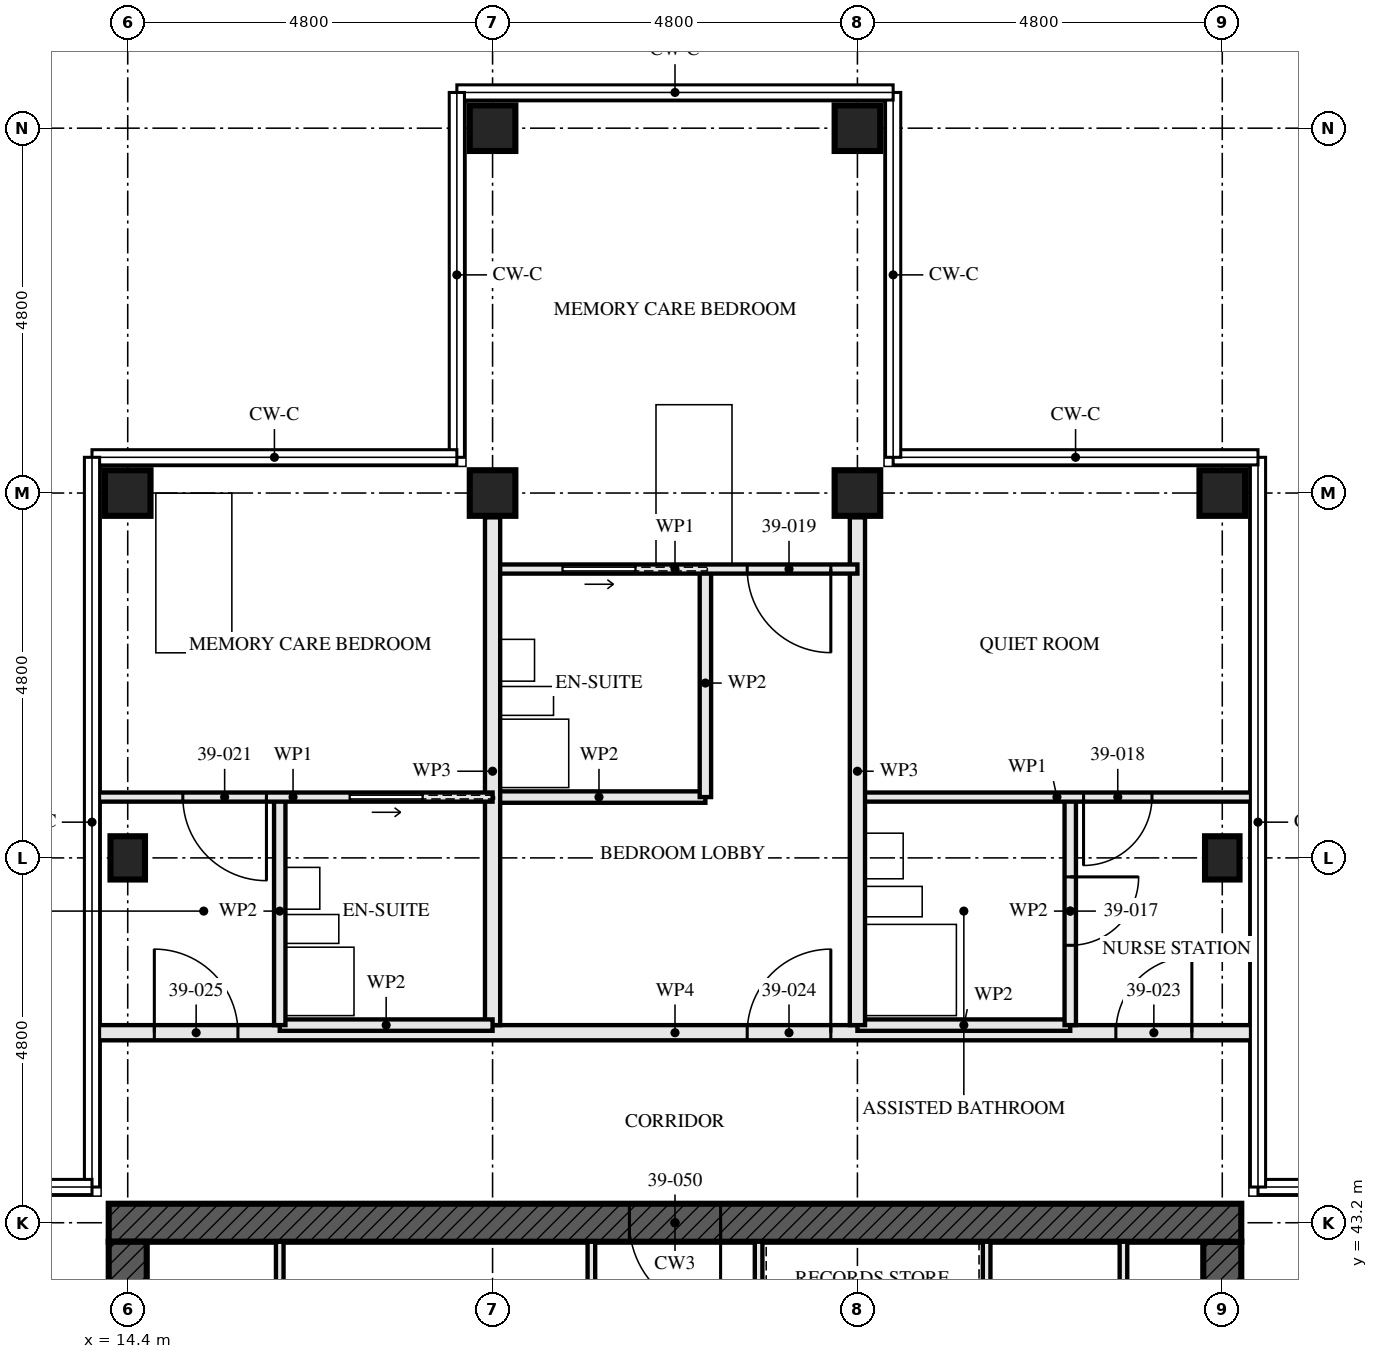
"""IFC4 building model, lengths in metres.
Left out: names, types, materials, properties, quantities, classifications, styles, units other than length and angle.
Written with IfcOpenShell. Run it as: python <this file> out.ifc"""

import sys

from ifc_helpers import new_model, si_unit, direction, frame, frame_2d, origin, origin_2d, place, context, subcontext, project, spatial, rectangle, hollow_rectangle, i_section, extrude, element, fill, save


model = new_model("IFC4")
c1 = context("Model", 3, precision=1e-05, world=origin(), true_north=direction((0.0, 1.0)))
c2 = subcontext(c1, "Body", "Model", "MODEL_VIEW")
j1 = project(units=[si_unit("LENGTHUNIT", "METRE"), si_unit("PLANEANGLEUNIT", "RADIAN")], contexts=[c1])
p1 = place(None, origin())
s1 = spatial("IfcSite", under=j1, at=p1, CompositionType="ELEMENT")
p2 = place(p1, origin())
s2 = spatial("IfcBuilding", under=s1, at=p2, CompositionType="ELEMENT")
p3 = place(p2, frame((0.0, 0.0, 144.5)))
s3 = spatial("IfcBuildingStorey", under=s2, at=p3, CompositionType="ELEMENT", Elevation=144.5)
p4 = place(p3, frame((14.4, 48.0, 0.0), z_axis=(0.0, 0.0, 1.0), x_axis=(1.0, 0.0, 0.0)))
e1 = element("IfcColumn", 1, at=p4, inside=s3, PredefinedType="COLUMN", context=c2, shape_type="SweptSolid", body=[
    extrude(i_section(OverallWidth=0.454, OverallDepth=0.569, WebThickness=0.078, FlangeThickness=0.125, FilletRadius=0.015, at=origin_2d()), origin(), (0.0, 0.0, 1.0), 3.5),
])
for number, where, z_axis, x_axis in (
    (2, (14.4, 52.8, 0.0), (0.0, 0.0, 1.0), (0.0, 1.0, 0.0)),
    (3, (19.2, 52.8, 0.0), (0.0, 0.0, 1.0), (0.0, 1.0, 0.0)),
    (4, (19.2, 57.6, 0.0), (0.0, 0.0, 1.0), (0.0, 1.0, 0.0)),
    (5, (24.0, 52.8, 0.0), (0.0, 0.0, 1.0), (0.0, 1.0, 0.0)),
    (6, (24.0, 57.6, 0.0), (0.0, 0.0, 1.0), (0.0, 1.0, 0.0)),
):
    element("IfcColumn", number, at=place(p3, frame(where, z_axis=z_axis, x_axis=x_axis)), inside=s3, PredefinedType="COLUMN", context=c2, shape_type="SweptSolid", body=[
        extrude(hollow_rectangle(XDim=0.6, YDim=0.6, WallThickness=0.05, at=origin_2d()), origin(), (0.0, 0.0, 1.0), 3.5),
    ])
p5 = place(p3, frame((28.8, 48.0, 0.0), z_axis=(0.0, 0.0, 1.0), x_axis=(1.0, 0.0, 0.0)))
e7 = element("IfcColumn", 7, at=p5, inside=s3, PredefinedType="COLUMN", context=c2, shape_type="SweptSolid", body=[
    extrude(i_section(OverallWidth=0.454, OverallDepth=0.569, WebThickness=0.078, FlangeThickness=0.125, FilletRadius=0.015, at=origin_2d()), origin(), (0.0, 0.0, 1.0), 3.5),
])
p6 = place(p3, frame((28.8, 52.8, 0.0), z_axis=(0.0, 0.0, 1.0), x_axis=(0.0, 1.0, 0.0)))
e8 = element("IfcColumn", 8, at=p6, inside=s3, PredefinedType="COLUMN", context=c2, shape_type="SweptSolid", body=[
    extrude(hollow_rectangle(XDim=0.6, YDim=0.6, WallThickness=0.05, at=origin_2d()), origin(), (0.0, 0.0, 1.0), 3.5),
])
p7 = place(p3, frame((29.05, 43.2, -0.17), z_axis=(0.0, 0.0, 1.0), x_axis=(-1.0, 0.0, 0.0)))
e9 = element("IfcWall", 9, at=p7, inside=s3, PredefinedType="SHEAR", context=c2, shape_type="SweptSolid", body=[
    extrude(rectangle(XDim=14.9, YDim=0.5, at=frame_2d((7.45, 0.0))), origin(), (0.0, 0.0, 1.0), 3.5),
])
p8 = place(p7, frame((6.85, 0.0, 0.17)))
e10 = element("IfcOpeningElement", 10, at=p8, cuts=e9, PredefinedType="OPENING", context=c2, shape_type="SweptSolid", body=[
    extrude(rectangle(XDim=1.2, YDim=2.1, at=frame_2d((0.6, 1.05))), frame((0.0, 0.26, 0.0), z_axis=(0.0, -1.0, 0.0), x_axis=(1.0, 0.0, 0.0)), (0.0, 0.0, 1.0), 0.521),
])
p9 = place(p3, frame((14.4, 42.95, -0.17), z_axis=(0.0, 0.0, 1.0), x_axis=(0.0, -1.0, 0.0)))
e11 = element("IfcWall", 11, at=p9, inside=s3, PredefinedType="SHEAR", context=c2, shape_type="SweptSolid", body=[
    extrude(rectangle(XDim=13.9, YDim=0.5, at=frame_2d((6.95, 0.0))), origin(), (0.0, 0.0, 1.0), 3.5),
])
p10 = place(p9, frame((6.35, 0.0, 0.17)))
e12 = element("IfcOpeningElement", 12, at=p10, cuts=e11, PredefinedType="OPENING", context=c2, shape_type="SweptSolid", body=[
    extrude(rectangle(XDim=1.2, YDim=2.1, at=frame_2d((0.6, 1.05))), frame((0.0, 0.26, 0.0), z_axis=(0.0, -1.0, 0.0), x_axis=(1.0, 0.0, 0.0)), (0.0, 0.0, 1.0), 0.521),
])
p11 = place(p3, frame((28.8, 29.05, -0.17), z_axis=(0.0, 0.0, 1.0), x_axis=(0.0, 1.0, 0.0)))
e13 = element("IfcWall", 13, at=p11, inside=s3, PredefinedType="SHEAR", context=c2, shape_type="SweptSolid", body=[
    extrude(rectangle(XDim=13.9, YDim=0.5, at=frame_2d((6.95, 0.0))), origin(), (0.0, 0.0, 1.0), 3.5),
])
p12 = place(p11, frame((6.35, 0.0, 0.17)))
e14 = element("IfcOpeningElement", 14, at=p12, cuts=e13, PredefinedType="OPENING", context=c2, shape_type="SweptSolid", body=[
    extrude(rectangle(XDim=1.2, YDim=2.1, at=frame_2d((0.6, 1.05))), frame((0.0, 0.26, 0.0), z_axis=(0.0, -1.0, 0.0), x_axis=(1.0, 0.0, 0.0)), (0.0, 0.0, 1.0), 0.521),
])
p13 = place(p3, frame((26.8, 48.8, 0.0), z_axis=(0.0, 0.0, 1.0), x_axis=(0.0, -1.0, 0.0)))
e15 = element("IfcWall", 15, at=p13, inside=s3, PredefinedType="PARTITIONING", context=c2, shape_type="SweptSolid", body=[
    extrude(rectangle(XDim=3.0, YDim=0.15, at=frame_2d((1.5, 0.0))), origin(), (0.0, 0.0, 1.0), 2.55),
])
p14 = place(p13, frame((1.05, 0.0, 0.0)))
e16 = element("IfcOpeningElement", 16, at=p14, cuts=e15, PredefinedType="OPENING", context=c2, shape_type="SweptSolid", body=[
    extrude(rectangle(XDim=0.9, YDim=2.1, at=frame_2d((0.45, 1.05))), frame((0.0, 0.085, 0.0), z_axis=(0.0, -1.0, 0.0), x_axis=(1.0, 0.0, 0.0)), (0.0, 0.0, 1.0), 0.171),
])
p15 = place(p3, frame((26.8, 45.8, 0.0), z_axis=(0.0, 0.0, 1.0), x_axis=(-1.0, 0.0, 0.0)))
e17 = element("IfcWall", 17, at=p15, inside=s3, PredefinedType="PARTITIONING", context=c2, shape_type="SweptSolid", body=[
    extrude(rectangle(XDim=2.8, YDim=0.15, at=frame_2d((1.4, 0.0))), origin(), (0.0, 0.0, 1.0), 3.33),
])
p16 = place(p3, frame((29.25, 48.8, 0.0), z_axis=(0.0, 0.0, 1.0), x_axis=(-1.0, 0.0, 0.0)))
e18 = element("IfcWall", 18, at=p16, inside=s3, PredefinedType="PARTITIONING", context=c2, shape_type="SweptSolid", body=[
    extrude(rectangle(XDim=5.25, YDim=0.12, at=frame_2d((2.625, 0.0))), origin(), (0.0, 0.0, 1.0), 2.32),
])
p17 = place(p16, frame((1.375, 0.0, 0.0)))
e19 = element("IfcOpeningElement", 19, at=p17, cuts=e18, PredefinedType="OPENING", context=c2, shape_type="SweptSolid", body=[
    extrude(rectangle(XDim=0.9, YDim=2.1, at=frame_2d((0.45, 1.05))), frame((0.0, 0.071, 0.0), z_axis=(0.0, -1.0, 0.0), x_axis=(1.0, 0.0, 0.0)), (0.0, 0.0, 1.0), 0.141),
])
p18 = place(p3, frame((24.0, 52.48, 0.0), z_axis=(0.0, 0.0, 1.0), x_axis=(0.0, -1.0, 0.0)))
e20 = element("IfcWall", 20, at=p18, inside=s3, PredefinedType="PARTITIONING", context=c2, shape_type="SweptSolid", body=[
    extrude(rectangle(XDim=6.68, YDim=0.2, at=frame_2d((3.34, 0.0))), origin(), (0.0, 0.0, 1.0), 2.55),
])
p19 = place(p3, frame((22.0, 51.8, 0.0), z_axis=(0.0, 0.0, 1.0), x_axis=(0.0, -1.0, 0.0)))
e21 = element("IfcWall", 21, at=p19, inside=s3, PredefinedType="PARTITIONING", context=c2, shape_type="SweptSolid", body=[
    extrude(rectangle(XDim=3.0, YDim=0.15, at=frame_2d((1.5, 0.0))), origin(), (0.0, 0.0, 1.0), 3.33),
])
p20 = place(p3, frame((22.0, 48.8, 0.0), z_axis=(0.0, 0.0, 1.0), x_axis=(-1.0, 0.0, 0.0)))
e22 = element("IfcWall", 22, at=p20, inside=s3, PredefinedType="PARTITIONING", context=c2, shape_type="SweptSolid", body=[
    extrude(rectangle(XDim=2.8, YDim=0.15, at=frame_2d((1.4, 0.0))), origin(), (0.0, 0.0, 1.0), 3.33),
])
p21 = place(p3, frame((24.0, 51.8, 0.0), z_axis=(0.0, 0.0, 1.0), x_axis=(-1.0, 0.0, 0.0)))
e23 = element("IfcWall", 23, at=p21, inside=s3, PredefinedType="PARTITIONING", context=c2, shape_type="SweptSolid", body=[
    extrude(rectangle(XDim=4.8, YDim=0.12, at=frame_2d((2.4, 0.0))), origin(), (0.0, 0.0, 1.0), 3.33),
])
p22 = place(p21, frame((0.35, 0.0, 0.0)))
e24 = element("IfcOpeningElement", 24, at=p22, cuts=e23, PredefinedType="OPENING", context=c2, shape_type="SweptSolid", body=[
    extrude(rectangle(XDim=1.1, YDim=2.1, at=frame_2d((0.55, 1.05))), frame((0.0, 0.071, 0.0), z_axis=(0.0, -1.0, 0.0), x_axis=(1.0, 0.0, 0.0)), (0.0, 0.0, 1.0), 0.141),
])
p23 = place(p21, frame((2.925, 0.0, 0.0)))
e25 = element("IfcOpeningElement", 25, at=p23, cuts=e23, PredefinedType="OPENING", context=c2, shape_type="SweptSolid", body=[
    extrude(rectangle(XDim=0.95, YDim=2.1, at=frame_2d((0.475, 1.05))), frame((0.0, 0.071, 0.0), z_axis=(0.0, -1.0, 0.0), x_axis=(1.0, 0.0, 0.0)), (0.0, 0.0, 1.0), 0.141),
])
p24 = place(p3, frame((19.2, 52.48, 0.0), z_axis=(0.0, 0.0, 1.0), x_axis=(0.0, -1.0, 0.0)))
e26 = element("IfcWall", 26, at=p24, inside=s3, PredefinedType="PARTITIONING", context=c2, shape_type="SweptSolid", body=[
    extrude(rectangle(XDim=6.68, YDim=0.2, at=frame_2d((3.34, 0.0))), origin(), (0.0, 0.0, 1.0), 2.55),
])
p25 = place(p3, frame((16.4, 48.8, 0.0), z_axis=(0.0, 0.0, 1.0), x_axis=(0.0, -1.0, 0.0)))
e27 = element("IfcWall", 27, at=p25, inside=s3, PredefinedType="PARTITIONING", context=c2, shape_type="SweptSolid", body=[
    extrude(rectangle(XDim=3.0, YDim=0.15, at=frame_2d((1.5, 0.0))), origin(), (0.0, 0.0, 1.0), 2.55),
])
p26 = place(p3, frame((19.2, 45.8, 0.0), z_axis=(0.0, 0.0, 1.0), x_axis=(-1.0, 0.0, 0.0)))
e28 = element("IfcWall", 28, at=p26, inside=s3, PredefinedType="PARTITIONING", context=c2, shape_type="SweptSolid", body=[
    extrude(rectangle(XDim=2.8, YDim=0.15, at=frame_2d((1.4, 0.0))), origin(), (0.0, 0.0, 1.0), 3.33),
])
p27 = place(p3, frame((19.2, 48.8, 0.0), z_axis=(0.0, 0.0, 1.0), x_axis=(-1.0, 0.0, 0.0)))
e29 = element("IfcWall", 29, at=p27, inside=s3, PredefinedType="PARTITIONING", context=c2, shape_type="SweptSolid", body=[
    extrude(rectangle(XDim=5.25, YDim=0.12, at=frame_2d((2.625, 0.0))), origin(), (0.0, 0.0, 1.0), 2.32),
])
p28 = place(p27, frame((2.975, 0.0, 0.0)))
e30 = element("IfcOpeningElement", 30, at=p28, cuts=e29, PredefinedType="OPENING", context=c2, shape_type="SweptSolid", body=[
    extrude(rectangle(XDim=1.1, YDim=2.1, at=frame_2d((0.55, 1.05))), frame((0.0, 0.071, 0.0), z_axis=(0.0, -1.0, 0.0), x_axis=(1.0, 0.0, 0.0)), (0.0, 0.0, 1.0), 0.141),
])
p29 = place(p27, frame((0.925, 0.0, 0.0)))
e31 = element("IfcOpeningElement", 31, at=p29, cuts=e29, PredefinedType="OPENING", context=c2, shape_type="SweptSolid", body=[
    extrude(rectangle(XDim=0.95, YDim=2.1, at=frame_2d((0.475, 1.05))), frame((0.0, 0.071, 0.0), z_axis=(0.0, -1.0, 0.0), x_axis=(1.0, 0.0, 0.0)), (0.0, 0.0, 1.0), 0.141),
])
p30 = place(p3, frame((29.25, 45.7, 0.0), z_axis=(0.0, 0.0, 1.0), x_axis=(-1.0, 0.0, 0.0)))
e32 = element("IfcWall", 32, at=p30, inside=s3, PredefinedType="PARTITIONING", context=c2, shape_type="SweptSolid", body=[
    extrude(rectangle(XDim=15.3, YDim=0.2, at=frame_2d((7.65, 0.0))), origin(), (0.0, 0.0, 1.0), 2.32),
])
p31 = place(p30, frame((0.85, 0.0, 0.0)))
e33 = element("IfcOpeningElement", 33, at=p31, cuts=e32, PredefinedType="OPENING", context=c2, shape_type="SweptSolid", body=[
    extrude(rectangle(XDim=1.0, YDim=2.1, at=frame_2d((0.5, 1.05))), frame((0.0, 0.111, 0.0), z_axis=(0.0, -1.0, 0.0), x_axis=(1.0, 0.0, 0.0)), (0.0, 0.0, 1.0), 0.221),
])
p32 = place(p30, frame((5.6, 0.0, 0.0)))
e34 = element("IfcOpeningElement", 34, at=p32, cuts=e32, PredefinedType="OPENING", context=c2, shape_type="SweptSolid", body=[
    extrude(rectangle(XDim=1.1, YDim=2.1, at=frame_2d((0.55, 1.05))), frame((0.0, 0.111, 0.0), z_axis=(0.0, -1.0, 0.0), x_axis=(1.0, 0.0, 0.0)), (0.0, 0.0, 1.0), 0.221),
])
p33 = place(p30, frame((13.4, 0.0, 0.0)))
e35 = element("IfcOpeningElement", 35, at=p33, cuts=e32, PredefinedType="OPENING", context=c2, shape_type="SweptSolid", body=[
    extrude(rectangle(XDim=1.1, YDim=2.1, at=frame_2d((0.55, 1.05))), frame((0.0, 0.111, 0.0), z_axis=(0.0, -1.0, 0.0), x_axis=(1.0, 0.0, 0.0)), (0.0, 0.0, 1.0), 0.221),
])
for number, where, z_axis, x_axis in (
    (36, (16.4, 37.15, 0.0), (0.0, 0.0, 1.0), (0.0, 1.0, 0.0)),
    (37, (27.5, 37.15, 0.0), (0.0, 0.0, 1.0), (0.0, 1.0, 0.0)),
):
    element("IfcWall", number, at=place(p3, frame(where, z_axis=z_axis, x_axis=x_axis)), inside=s3, PredefinedType="SOLIDWALL", context=c2, shape_type="SweptSolid", body=[
        extrude(rectangle(XDim=5.8, YDim=0.1, at=frame_2d((2.9, 0.0))), origin(), (0.0, 0.0, 1.0), 3.33),
    ])
p34 = place(p3, frame((20.5, 37.15, 0.0), z_axis=(0.0, 0.0, 1.0), x_axis=(0.0, 1.0, 0.0)))
e38 = element("IfcWall", 38, at=p34, inside=s3, PredefinedType="SOLIDWALL", context=c2, shape_type="SweptSolid", body=[
    extrude(rectangle(XDim=5.8, YDim=0.1, at=frame_2d((2.9, 0.0))), origin(), (0.0, 0.0, 1.0), 3.33),
])
p35 = place(p34, frame((0.975, 0.0, 0.0)))
e39 = element("IfcOpeningElement", 39, at=p35, cuts=e38, PredefinedType="OPENING", context=c2, shape_type="SweptSolid", body=[
    extrude(rectangle(XDim=0.9, YDim=2.1, at=frame_2d((0.45, 1.05))), frame((0.0, 0.061, 0.0), z_axis=(0.0, -1.0, 0.0), x_axis=(1.0, 0.0, 0.0)), (0.0, 0.0, 1.0), 0.121),
])
for number, where, z_axis, x_axis in (
    (40, (22.7, 37.15, 0.0), (0.0, 0.0, 1.0), (0.0, 1.0, 0.0)),
    (41, (25.7, 37.15, 0.0), (0.0, 0.0, 1.0), (0.0, 1.0, 0.0)),
):
    element("IfcWall", number, at=place(p3, frame(where, z_axis=z_axis, x_axis=x_axis)), inside=s3, PredefinedType="SOLIDWALL", context=c2, shape_type="SweptSolid", body=[
        extrude(rectangle(XDim=5.8, YDim=0.1, at=frame_2d((2.9, 0.0))), origin(), (0.0, 0.0, 1.0), 3.33),
    ])
p36 = place(p14, origin())
e42 = element("IfcDoor", 42, at=p36, inside=s3, OperationType="SINGLE_SWING_RIGHT", PredefinedType="DOOR", context=c2, shape_type="SweptSolid", body=[
    extrude(rectangle(XDim=0.9, YDim=2.1, at=frame_2d((0.45, 1.05))), frame((0.0, 0.022, 0.0), z_axis=(0.0, -1.0, 0.0), x_axis=(1.0, 0.0, 0.0)), (0.0, 0.0, 1.0), 0.044),
])
fill(e16, e42)
p37 = place(p17, origin())
e43 = element("IfcDoor", 43, at=p37, inside=s3, OperationType="SINGLE_SWING_LEFT", PredefinedType="DOOR", context=c2, shape_type="SweptSolid", body=[
    extrude(rectangle(XDim=0.9, YDim=2.1, at=frame_2d((0.45, 1.05))), frame((0.0, 0.022, 0.0), z_axis=(0.0, -1.0, 0.0), x_axis=(1.0, 0.0, 0.0)), (0.0, 0.0, 1.0), 0.044),
])
fill(e19, e43)
p38 = place(p22, origin())
e44 = element("IfcDoor", 44, at=p38, inside=s3, OperationType="SINGLE_SWING_RIGHT", PredefinedType="DOOR", context=c2, shape_type="SweptSolid", body=[
    extrude(rectangle(XDim=1.1, YDim=2.1, at=frame_2d((0.55, 1.05))), frame((0.0, 0.022, 0.0), z_axis=(0.0, -1.0, 0.0), x_axis=(1.0, 0.0, 0.0)), (0.0, 0.0, 1.0), 0.044),
])
fill(e24, e44)
p39 = place(p23, origin())
e45 = element("IfcDoor", 45, at=p39, inside=s3, OperationType="SLIDING_TO_RIGHT", PredefinedType="DOOR", context=c2, shape_type="SweptSolid", body=[
    extrude(rectangle(XDim=0.95, YDim=2.1, at=frame_2d((0.475, 1.05))), frame((0.0, 0.022, 0.0), z_axis=(0.0, -1.0, 0.0), x_axis=(1.0, 0.0, 0.0)), (0.0, 0.0, 1.0), 0.044),
])
fill(e25, e45)
p40 = place(p28, origin())
e46 = element("IfcDoor", 46, at=p40, inside=s3, OperationType="SINGLE_SWING_RIGHT", PredefinedType="DOOR", context=c2, shape_type="SweptSolid", body=[
    extrude(rectangle(XDim=1.1, YDim=2.1, at=frame_2d((0.55, 1.05))), frame((0.0, 0.022, 0.0), z_axis=(0.0, -1.0, 0.0), x_axis=(1.0, 0.0, 0.0)), (0.0, 0.0, 1.0), 0.044),
])
fill(e30, e46)
p41 = place(p29, origin())
e47 = element("IfcDoor", 47, at=p41, inside=s3, OperationType="SLIDING_TO_RIGHT", PredefinedType="DOOR", context=c2, shape_type="SweptSolid", body=[
    extrude(rectangle(XDim=0.95, YDim=2.1, at=frame_2d((0.475, 1.05))), frame((0.0, 0.022, 0.0), z_axis=(0.0, -1.0, 0.0), x_axis=(1.0, 0.0, 0.0)), (0.0, 0.0, 1.0), 0.044),
])
fill(e31, e47)
p42 = place(p31, frame((1.0, 0.0, 0.0), z_axis=(0.0, 0.0, 1.0), x_axis=(-1.0, 0.0, 0.0)))
e48 = element("IfcDoor", 48, at=p42, inside=s3, OperationType="SINGLE_SWING_LEFT", PredefinedType="DOOR", context=c2, shape_type="SweptSolid", body=[
    extrude(rectangle(XDim=1.0, YDim=2.1, at=frame_2d((0.5, 1.05))), frame((0.0, 0.027, 0.0), z_axis=(0.0, -1.0, 0.0), x_axis=(1.0, 0.0, 0.0)), (0.0, 0.0, 1.0), 0.054),
])
fill(e33, e48)
p43 = place(p32, frame((1.1, 0.0, 0.0), z_axis=(0.0, 0.0, 1.0), x_axis=(-1.0, 0.0, 0.0)))
e49 = element("IfcDoor", 49, at=p43, inside=s3, OperationType="SINGLE_SWING_LEFT", PredefinedType="DOOR", context=c2, shape_type="SweptSolid", body=[
    extrude(rectangle(XDim=1.1, YDim=2.1, at=frame_2d((0.55, 1.05))), frame((0.0, 0.027, 0.0), z_axis=(0.0, -1.0, 0.0), x_axis=(1.0, 0.0, 0.0)), (0.0, 0.0, 1.0), 0.054),
])
fill(e34, e49)
p44 = place(p33, frame((1.1, 0.0, 0.0), z_axis=(0.0, 0.0, 1.0), x_axis=(-1.0, 0.0, 0.0)))
e50 = element("IfcDoor", 50, at=p44, inside=s3, OperationType="SINGLE_SWING_RIGHT", PredefinedType="DOOR", context=c2, shape_type="SweptSolid", body=[
    extrude(rectangle(XDim=1.1, YDim=2.1, at=frame_2d((0.55, 1.05))), frame((0.0, 0.027, 0.0), z_axis=(0.0, -1.0, 0.0), x_axis=(1.0, 0.0, 0.0)), (0.0, 0.0, 1.0), 0.054),
])
fill(e35, e50)
p45 = place(p8, origin())
e51 = element("IfcDoor", 51, at=p45, inside=s3, OperationType="SINGLE_SWING_LEFT", PredefinedType="DOOR", context=c2, shape_type="SweptSolid", body=[
    extrude(rectangle(XDim=1.2, YDim=2.1, at=frame_2d((0.6, 1.05))), frame((0.0, 0.027, 0.0), z_axis=(0.0, -1.0, 0.0), x_axis=(1.0, 0.0, 0.0)), (0.0, 0.0, 1.0), 0.054),
])
fill(e10, e51)
save(model, sys.argv[1])
